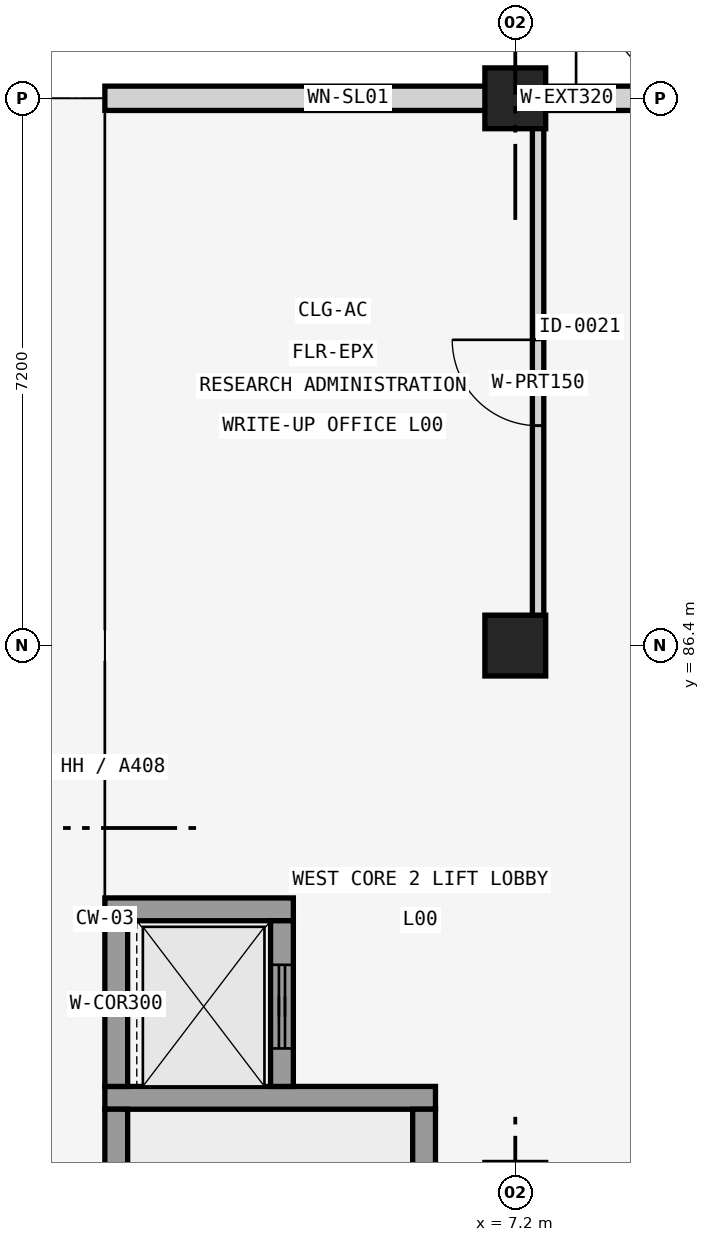
"""IFC4 building model, lengths in metres.
Left out: names, types, materials, properties, quantities, classifications, styles, units other than length and angle.
Written with IfcOpenShell. Run it as: python <this file> out.ifc"""

import sys

from ifc_helpers import new_model, si_unit, direction, frame, frame_2d, origin, origin_2d, place, context, subcontext, project, spatial, rectangle, extrude, element, fill, save


model = new_model("IFC4")
c1 = context("Model", 3, precision=1e-05, world=origin(), true_north=direction((0.0, 1.0)))
c2 = subcontext(c1, "Body", "Model", "MODEL_VIEW")
j1 = project(units=[si_unit("LENGTHUNIT", "METRE"), si_unit("PLANEANGLEUNIT", "RADIAN")], contexts=[c1])
p1 = place(None, origin())
s1 = spatial("IfcSite", under=j1, at=p1, CompositionType="ELEMENT")
p2 = place(p1, origin())
s2 = spatial("IfcBuilding", under=s1, at=p2, CompositionType="ELEMENT")
p3 = place(p2, origin())
s3 = spatial("IfcBuildingStorey", under=s2, at=p3, CompositionType="ELEMENT", Elevation=0.0)
for number, where, z_axis, x_axis in (
    (1, (7.2, 86.4, 0.0), (0.0, 0.0, 1.0), (1.0, 0.0, 0.0)),
    (2, (7.2, 93.6, 0.0), (0.0, 0.0, 1.0), (1.0, 0.0, 0.0)),
):
    element("IfcColumn", number, at=place(p3, frame(where, z_axis=z_axis, x_axis=x_axis)), inside=s3, PredefinedType="COLUMN", context=c2, shape_type="SweptSolid", body=[
        extrude(rectangle(XDim=0.8, YDim=0.8, at=origin_2d()), origin(), (0.0, 0.0, 1.0), 4.8),
    ])
p4 = place(p3, frame((1.8, 93.6, 0.0), z_axis=(0.0, 0.0, 1.0), x_axis=(1.0, 0.0, 0.0)))
e3 = element("IfcWall", 3, at=p4, inside=s3, PredefinedType="SOLIDWALL", context=c2, shape_type="SweptSolid", body=[
    extrude(rectangle(XDim=12.16, YDim=0.32, at=frame_2d((6.08, 0.0))), origin(), (0.0, 0.0, 1.0), 4.06),
])
p5 = place(p4, frame((2.975, 0.0, 0.9)))
e4 = element("IfcOpeningElement", 4, at=p5, cuts=e3, PredefinedType="OPENING", context=c2, shape_type="SweptSolid", body=[
    extrude(rectangle(XDim=0.45, YDim=2.4, at=frame_2d((0.225, 1.2))), frame((0.0, 0.17, 0.0), z_axis=(0.0, -1.0, 0.0), x_axis=(1.0, 0.0, 0.0)), (0.0, 0.0, 1.0), 0.34),
])
p6 = place(p4, frame((6.2, 0.0, 0.0)))
e5 = element("IfcOpeningElement", 5, at=p6, cuts=e3, PredefinedType="OPENING", context=c2, shape_type="SweptSolid", body=[
    extrude(rectangle(XDim=1.8, YDim=2.4, at=frame_2d((0.9, 1.2))), frame((0.0, 0.17, 0.0), z_axis=(0.0, -1.0, 0.0), x_axis=(1.0, 0.0, 0.0)), (0.0, 0.0, 1.0), 0.34),
])
p7 = place(p3, frame((1.8, 80.45, 0.0), z_axis=(0.0, 0.0, 1.0), x_axis=(1.0, 0.0, 0.0)))
e6 = element("IfcWall", 6, at=p7, inside=s3, PredefinedType="SHEAR", context=c2, shape_type="SweptSolid", body=[
    extrude(rectangle(XDim=4.35, YDim=0.3, at=frame_2d((2.175, 0.0))), origin(), (0.0, 0.0, 1.0), 4.45),
])
p8 = place(p3, frame((1.95, 72.5, 0.0), z_axis=(0.0, 0.0, 1.0), x_axis=(0.0, 1.0, 0.0)))
e7 = element("IfcWall", 7, at=p8, inside=s3, PredefinedType="SHEAR", context=c2, shape_type="SweptSolid", body=[
    extrude(rectangle(XDim=7.8, YDim=0.3, at=frame_2d((3.9, 0.0))), origin(), (0.0, 0.0, 1.0), 4.45),
])
p9 = place(p3, frame((6.0, 72.5, 0.0), z_axis=(0.0, 0.0, 1.0), x_axis=(0.0, 1.0, 0.0)))
e8 = element("IfcWall", 8, at=p9, inside=s3, PredefinedType="SHEAR", context=c2, shape_type="SweptSolid", body=[
    extrude(rectangle(XDim=7.8, YDim=0.3, at=frame_2d((3.9, 0.0))), origin(), (0.0, 0.0, 1.0), 4.45),
])
p10 = place(p9, frame((0.4, 0.0, 0.0)))
e9 = element("IfcOpeningElement", 9, at=p10, cuts=e8, PredefinedType="OPENING", context=c2, shape_type="SweptSolid", body=[
    extrude(rectangle(XDim=1.15, YDim=2.2, at=frame_2d((0.575, 1.1))), frame((0.0, 0.16, 0.0), z_axis=(0.0, -1.0, 0.0), x_axis=(1.0, 0.0, 0.0)), (0.0, 0.0, 1.0), 0.32),
])
p11 = place(p3, frame((1.8, 82.93, 0.0), z_axis=(0.0, 0.0, 1.0), x_axis=(1.0, 0.0, 0.0)))
e10 = element("IfcWall", 10, at=p11, inside=s3, PredefinedType="SHEAR", context=c2, shape_type="SweptSolid", body=[
    extrude(rectangle(XDim=2.48, YDim=0.3, at=frame_2d((1.24, 0.0))), origin(), (0.0, 0.0, 1.0), 4.45),
])
p12 = place(p3, frame((1.95, 80.6, 0.0), z_axis=(0.0, 0.0, 1.0), x_axis=(0.0, 1.0, 0.0)))
e11 = element("IfcWall", 11, at=p12, inside=s3, PredefinedType="SHEAR", context=c2, shape_type="SweptSolid", body=[
    extrude(rectangle(XDim=2.18, YDim=0.3, at=frame_2d((1.09, 0.0))), origin(), (0.0, 0.0, 1.0), 4.45),
])
p13 = place(p3, frame((4.13, 80.6, 0.0), z_axis=(0.0, 0.0, 1.0), x_axis=(0.0, 1.0, 0.0)))
e12 = element("IfcWall", 12, at=p13, inside=s3, PredefinedType="SHEAR", context=c2, shape_type="SweptSolid", body=[
    extrude(rectangle(XDim=2.18, YDim=0.3, at=frame_2d((1.09, 0.0))), origin(), (0.0, 0.0, 1.0), 4.45),
])
p14 = place(p13, frame((0.5, 0.0, 0.0)))
e13 = element("IfcOpeningElement", 13, at=p14, cuts=e12, PredefinedType="OPENING", context=c2, shape_type="SweptSolid", body=[
    extrude(rectangle(XDim=1.1, YDim=2.2, at=frame_2d((0.55, 1.1))), frame((0.0, 0.16, 0.0), z_axis=(0.0, -1.0, 0.0), x_axis=(1.0, 0.0, 0.0)), (0.0, 0.0, 1.0), 0.32),
])
p15 = place(p3, frame((7.5, 86.275, 0.0), z_axis=(0.0, 0.0, 1.0), x_axis=(0.0, 1.0, 0.0)))
e14 = element("IfcWall", 14, at=p15, inside=s3, PredefinedType="PARTITIONING", context=c2, shape_type="SweptSolid", body=[
    extrude(rectangle(XDim=7.165, YDim=0.15, at=frame_2d((3.583, 0.0))), origin(), (0.0, 0.0, 1.0), 3.75),
])
p16 = place(p15, frame((3.018, 0.0, 0.0)))
e15 = element("IfcOpeningElement", 15, at=p16, cuts=e14, PredefinedType="OPENING", context=c2, shape_type="SweptSolid", body=[
    extrude(rectangle(XDim=1.13, YDim=2.08, at=frame_2d((0.565, 1.04))), frame((0.0, 0.085, 0.0), z_axis=(0.0, -1.0, 0.0), x_axis=(1.0, 0.0, 0.0)), (0.0, 0.0, 1.0), 0.17),
])
p17 = place(p5, origin())
e16 = element("IfcWindow", 16, at=p17, inside=s3, PartitioningType="SINGLE_PANEL", PredefinedType="WINDOW", context=c2, shape_type="SweptSolid", body=[
    extrude(rectangle(XDim=0.45, YDim=2.4, at=frame_2d((0.225, 1.2))), frame((0.0, 0.03, 0.0), z_axis=(0.0, -1.0, 0.0), x_axis=(1.0, 0.0, 0.0)), (0.0, 0.0, 1.0), 0.06),
])
fill(e4, e16)
p18 = place(p6, origin())
e17 = element("IfcDoor", 17, at=p18, inside=s3, OperationType="DOUBLE_DOOR_SINGLE_SWING", PredefinedType="DOOR", context=c2, shape_type="SweptSolid", body=[
    extrude(rectangle(XDim=1.8, YDim=2.4, at=frame_2d((0.9, 1.2))), frame((0.0, 0.025, 0.0), z_axis=(0.0, -1.0, 0.0), x_axis=(1.0, 0.0, 0.0)), (0.0, 0.0, 1.0), 0.05),
])
fill(e5, e17)
p19 = place(p14, origin())
e18 = element("IfcDoor", 18, at=p19, inside=s3, OperationType="SLIDING_TO_LEFT", PredefinedType="DOOR", context=c2, shape_type="SweptSolid", body=[
    extrude(rectangle(XDim=1.1, YDim=2.2, at=frame_2d((0.55, 1.1))), frame((0.0, 0.025, 0.0), z_axis=(0.0, -1.0, 0.0), x_axis=(1.0, 0.0, 0.0)), (0.0, 0.0, 1.0), 0.05),
])
fill(e13, e18)
p20 = place(p16, origin())
e19 = element("IfcDoor", 19, at=p20, inside=s3, OperationType="SINGLE_SWING_RIGHT", PredefinedType="DOOR", context=c2, shape_type="SweptSolid", body=[
    extrude(rectangle(XDim=1.13, YDim=2.08, at=frame_2d((0.565, 1.04))), frame((0.0, 0.025, 0.0), z_axis=(0.0, -1.0, 0.0), x_axis=(1.0, 0.0, 0.0)), (0.0, 0.0, 1.0), 0.05),
])
fill(e15, e19)
save(model, sys.argv[1])
